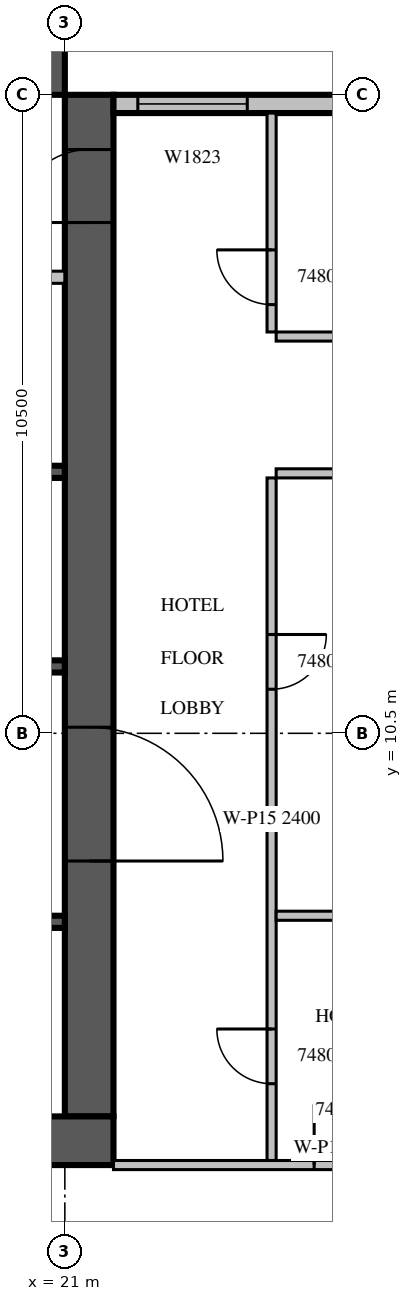
"""IFC4 building model, lengths in metres.
Left out: names, types, materials, properties, quantities, classifications, styles, units other than length and angle.
Written with IfcOpenShell. Run it as: python <this file> out.ifc"""

import sys

from ifc_helpers import new_model, si_unit, direction, frame, frame_2d, origin, place, context, subcontext, project, spatial, rectangle, extrude, source, transform, mapped, element, fill, save


model = new_model("IFC4")
c1 = context("Model", 3, precision=1e-05, world=origin(), true_north=direction((0.0, 1.0)))
c2 = subcontext(c1, "Body", "Model", "MODEL_VIEW")
j1 = project(units=[si_unit("LENGTHUNIT", "METRE"), si_unit("PLANEANGLEUNIT", "RADIAN")], contexts=[c1])
p1 = place(None, origin())
s1 = spatial("IfcSite", under=j1, at=p1, CompositionType="ELEMENT")
p2 = place(p1, origin())
s2 = spatial("IfcBuilding", under=s1, at=p2, CompositionType="ELEMENT")
p3 = place(p2, frame((0.0, 0.0, 215.8)))
s3 = spatial("IfcBuildingStorey", under=s2, at=p3, CompositionType="ELEMENT", Elevation=215.8)
m1 = source(origin(), c2, "Body", "SweptSolid", [
    extrude(rectangle(XDim=16.8, YDim=0.8, at=frame_2d((8.4, 0.0))), origin(), (0.0, 0.0, 1.0), 3.8),
])
p4 = place(p3, frame((21.4, 4.2, 0.0), z_axis=(0.0, 0.0, 1.0), x_axis=(0.0, 1.0, 0.0)))
e1 = element("IfcWall", 1, at=p4, inside=s3, PredefinedType="SHEAR", context=c2, shape_type="MappedRepresentation", body=[
    mapped(m1, transform((0.0, 0.0, 0.0), scale=1.0)),
])
m2 = source(origin(), c2, "Body", "SweptSolid", [
    extrude(rectangle(XDim=2.2, YDim=2.1, at=frame_2d((1.1, 1.05))), frame((0.0, 0.41, 0.0), z_axis=(0.0, -1.0, 0.0), x_axis=(1.0, 0.0, 0.0)), (0.0, 0.0, 1.0), 0.82),
])
p5 = place(p4, frame((4.2, 0.0, 0.0)))
e2 = element("IfcOpeningElement", 2, at=p5, cuts=e1, PredefinedType="OPENING", context=c2, shape_type="MappedRepresentation", body=[
    mapped(m2, transform((0.0, 0.0, 0.0), scale=1.0)),
])
m3 = source(origin(), c2, "Body", "SweptSolid", [
    extrude(rectangle(XDim=1.2, YDim=2.1, at=frame_2d((0.6, 1.05))), frame((0.0, 0.41, 0.0), z_axis=(0.0, -1.0, 0.0), x_axis=(1.0, 0.0, 0.0)), (0.0, 0.0, 1.0), 0.82),
])
p6 = place(p4, frame((14.7, 0.0, 0.0)))
e3 = element("IfcOpeningElement", 3, at=p6, cuts=e1, PredefinedType="OPENING", context=c2, shape_type="MappedRepresentation", body=[
    mapped(m3, transform((0.0, 0.0, 0.0), scale=1.0)),
])
m4 = source(origin(), c2, "Body", "SweptSolid", [
    extrude(rectangle(XDim=17.6, YDim=0.8, at=frame_2d((8.8, 0.0))), origin(), (0.0, 0.0, 1.0), 3.8),
])
p7 = place(p3, frame((4.2, 3.8, 0.0), z_axis=(0.0, 0.0, 1.0), x_axis=(1.0, 0.0, 0.0)))
e4 = element("IfcWall", 4, at=p7, inside=s3, PredefinedType="SHEAR", context=c2, shape_type="MappedRepresentation", body=[
    mapped(m4, transform((0.0, 0.0, 0.0), scale=1.0)),
])
m5 = source(origin(), c2, "Body", "SweptSolid", [
    extrude(rectangle(XDim=0.9, YDim=2.1, at=frame_2d((0.45, 1.05))), frame((0.0, 0.41, 0.0), z_axis=(0.0, -1.0, 0.0), x_axis=(1.0, 0.0, 0.0)), (0.0, 0.0, 1.0), 0.82),
])
p8 = place(p7, frame((12.75, 0.0, 0.0)))
e5 = element("IfcOpeningElement", 5, at=p8, cuts=e4, PredefinedType="OPENING", context=c2, shape_type="MappedRepresentation", body=[
    mapped(m5, transform((0.0, 0.0, 0.0), scale=1.0)),
])
p9 = place(p3, frame((4.2, 21.4, 0.0), z_axis=(0.0, 0.0, 1.0), x_axis=(1.0, 0.0, 0.0)))
e6 = element("IfcWall", 6, at=p9, inside=s3, PredefinedType="SHEAR", context=c2, shape_type="MappedRepresentation", body=[
    mapped(m1, transform((0.0, 0.0, 0.0), scale=1.0)),
])
p10 = place(p9, frame((6.2, 0.0, 0.0)))
e7 = element("IfcOpeningElement", 7, at=p10, cuts=e6, PredefinedType="OPENING", context=c2, shape_type="MappedRepresentation", body=[
    mapped(m3, transform((0.0, 0.0, 0.0), scale=1.0)),
])
m6 = source(origin(), c2, "Body", "SweptSolid", [
    extrude(rectangle(XDim=7.15, YDim=0.3, at=frame_2d((3.575, 0.0))), origin(), (0.0, 0.0, 1.0), 3.4),
])
p11 = place(p3, frame((28.95, 20.85, 0.0), z_axis=(0.0, 0.0, 1.0), x_axis=(-1.0, 0.0, 0.0)))
e8 = element("IfcWall", 8, at=p11, inside=s3, PredefinedType="STANDARD", context=c2, shape_type="MappedRepresentation", body=[
    mapped(m6, transform((0.0, 0.0, 0.0), scale=1.0)),
])
m7 = source(origin(), c2, "Body", "SweptSolid", [
    extrude(rectangle(XDim=3.0, YDim=2.3, at=frame_2d((1.5, 1.15))), frame((0.0, 0.16, 0.0), z_axis=(0.0, -1.0, 0.0), x_axis=(1.0, 0.0, 0.0)), (0.0, 0.0, 1.0), 0.32),
])
p12 = place(p11, frame((0.15, 0.0, 0.6)))
e9 = element("IfcOpeningElement", 9, at=p12, cuts=e8, PredefinedType="OPENING", context=c2, shape_type="MappedRepresentation", body=[
    mapped(m7, transform((0.0, 0.0, 0.0), scale=1.0)),
])
m8 = source(origin(), c2, "Body", "SweptSolid", [
    extrude(rectangle(XDim=1.8, YDim=2.3, at=frame_2d((0.9, 1.15))), frame((0.0, 0.16, 0.0), z_axis=(0.0, -1.0, 0.0), x_axis=(1.0, 0.0, 0.0)), (0.0, 0.0, 1.0), 0.32),
])
p13 = place(p11, frame((4.95, 0.0, 0.6)))
e10 = element("IfcOpeningElement", 10, at=p13, cuts=e8, PredefinedType="OPENING", context=c2, shape_type="MappedRepresentation", body=[
    mapped(m8, transform((0.0, 0.0, 0.0), scale=1.0)),
])
m9 = source(origin(), c2, "Body", "SweptSolid", [
    extrude(rectangle(XDim=2.4, YDim=0.2, at=frame_2d((1.2, 0.0))), origin(), (0.0, 0.0, 1.0), 3.8),
])
p14 = place(p3, frame((18.6, 7.4, 0.0), z_axis=(0.0, 0.0, 1.0), x_axis=(1.0, 0.0, 0.0)))
e11 = element("IfcWall", 11, at=p14, inside=s3, PredefinedType="SOLIDWALL", context=c2, shape_type="MappedRepresentation", body=[
    mapped(m9, transform((0.0, 0.0, 0.0), scale=1.0)),
])
m10 = source(origin(), c2, "Body", "SweptSolid", [
    extrude(rectangle(XDim=9.6, YDim=0.2, at=frame_2d((4.8, 0.0))), origin(), (0.0, 0.0, 1.0), 3.8),
])
p15 = place(p3, frame((11.4, 11.6, 0.0), z_axis=(0.0, 0.0, 1.0), x_axis=(1.0, 0.0, 0.0)))
e12 = element("IfcWall", 12, at=p15, inside=s3, PredefinedType="SOLIDWALL", context=c2, shape_type="MappedRepresentation", body=[
    mapped(m10, transform((0.0, 0.0, 0.0), scale=1.0)),
])
p16 = place(p3, frame((11.4, 14.8, 0.0), z_axis=(0.0, 0.0, 1.0), x_axis=(1.0, 0.0, 0.0)))
e13 = element("IfcWall", 13, at=p16, inside=s3, PredefinedType="SOLIDWALL", context=c2, shape_type="MappedRepresentation", body=[
    mapped(m10, transform((0.0, 0.0, 0.0), scale=1.0)),
])
m11 = source(origin(), c2, "Body", "SweptSolid", [
    extrude(rectangle(XDim=1.1, YDim=2.1, at=frame_2d((0.55, 1.05))), frame((0.0, 0.11, 0.0), z_axis=(0.0, -1.0, 0.0), x_axis=(1.0, 0.0, 0.0)), (0.0, 0.0, 1.0), 0.22),
])
p17 = place(p16, frame((3.05, 0.0, 0.0)))
e14 = element("IfcOpeningElement", 14, at=p17, cuts=e13, PredefinedType="OPENING", context=c2, shape_type="MappedRepresentation", body=[
    mapped(m11, transform((0.0, 0.0, 0.0), scale=1.0)),
])
p18 = place(p16, frame((5.45, 0.0, 0.0)))
e15 = element("IfcOpeningElement", 15, at=p18, cuts=e13, PredefinedType="OPENING", context=c2, shape_type="MappedRepresentation", body=[
    mapped(m11, transform((0.0, 0.0, 0.0), scale=1.0)),
])
p19 = place(p16, frame((7.85, 0.0, 0.0)))
e16 = element("IfcOpeningElement", 16, at=p19, cuts=e13, PredefinedType="OPENING", context=c2, shape_type="MappedRepresentation", body=[
    mapped(m11, transform((0.0, 0.0, 0.0), scale=1.0)),
])
m12 = source(origin(), c2, "Body", "SweptSolid", [
    extrude(rectangle(XDim=11.45, YDim=0.2, at=frame_2d((5.725, 0.0))), origin(), (0.0, 0.0, 1.0), 3.4),
])
p20 = place(p3, frame((9.55, 18.0, 0.0), z_axis=(0.0, 0.0, 1.0), x_axis=(1.0, 0.0, 0.0)))
e17 = element("IfcWall", 17, at=p20, inside=s3, PredefinedType="PARTITIONING", context=c2, shape_type="MappedRepresentation", body=[
    mapped(m12, transform((0.0, 0.0, 0.0), scale=1.0)),
])
m13 = source(origin(), c2, "Body", "SweptSolid", [
    extrude(rectangle(XDim=0.9, YDim=2.1, at=frame_2d((0.45, 1.05))), frame((0.0, 0.11, 0.0), z_axis=(0.0, -1.0, 0.0), x_axis=(1.0, 0.0, 0.0)), (0.0, 0.0, 1.0), 0.22),
])
p21 = place(p20, frame((0.375, 0.0, 0.0)))
e18 = element("IfcOpeningElement", 18, at=p21, cuts=e17, PredefinedType="OPENING", context=c2, shape_type="MappedRepresentation", body=[
    mapped(m13, transform((0.0, 0.0, 0.0), scale=1.0)),
])
p22 = place(p20, frame((1.7, 0.0, 0.0)))
e19 = element("IfcOpeningElement", 19, at=p22, cuts=e17, PredefinedType="OPENING", context=c2, shape_type="MappedRepresentation", body=[
    mapped(m13, transform((0.0, 0.0, 0.0), scale=1.0)),
])
p23 = place(p20, frame((3.075, 0.0, 0.0)))
e20 = element("IfcOpeningElement", 20, at=p23, cuts=e17, PredefinedType="OPENING", context=c2, shape_type="MappedRepresentation", body=[
    mapped(m13, transform((0.0, 0.0, 0.0), scale=1.0)),
])
p24 = place(p20, frame((7.35, 0.0, 0.0)))
e21 = element("IfcOpeningElement", 21, at=p24, cuts=e17, PredefinedType="OPENING", context=c2, shape_type="MappedRepresentation", body=[
    mapped(m11, transform((0.0, 0.0, 0.0), scale=1.0)),
])
m14 = source(origin(), c2, "Body", "SweptSolid", [
    extrude(rectangle(XDim=11.225, YDim=0.15, at=frame_2d((5.612, 0.0))), origin(), (0.0, 0.0, 1.0), 2.4),
])
p25 = place(p3, frame((24.4, 14.7, 0.0), z_axis=(0.0, 0.0, 1.0), x_axis=(0.0, -1.0, 0.0)))
e22 = element("IfcWall", 22, at=p25, inside=s3, PredefinedType="PARTITIONING", context=c2, shape_type="MappedRepresentation", body=[
    mapped(m14, transform((0.0, 0.0, 0.0), scale=1.0)),
])
m15 = source(origin(), c2, "Body", "SweptSolid", [
    extrude(rectangle(XDim=0.9, YDim=2.1, at=frame_2d((0.45, 1.05))), frame((0.0, 0.085, 0.0), z_axis=(0.0, -1.0, 0.0), x_axis=(1.0, 0.0, 0.0)), (0.0, 0.0, 1.0), 0.17),
])
p26 = place(p25, frame((9.062, 0.0, 0.0)))
e23 = element("IfcOpeningElement", 23, at=p26, cuts=e22, PredefinedType="OPENING", context=c2, shape_type="MappedRepresentation", body=[
    mapped(m15, transform((0.0, 0.0, 0.0), scale=1.0)),
])
p27 = place(p25, frame((2.575, 0.0, 0.0)))
e24 = element("IfcOpeningElement", 24, at=p27, cuts=e22, PredefinedType="OPENING", context=c2, shape_type="MappedRepresentation", body=[
    mapped(m15, transform((0.0, 0.0, 0.0), scale=1.0)),
])
m16 = source(origin(), c2, "Body", "SweptSolid", [
    extrude(rectangle(XDim=3.6, YDim=0.15, at=frame_2d((1.8, 0.0))), origin(), (0.0, 0.0, 1.0), 3.4),
])
p28 = place(p3, frame((24.4, 20.7, 0.0), z_axis=(0.0, 0.0, 1.0), x_axis=(0.0, -1.0, 0.0)))
e25 = element("IfcWall", 25, at=p28, inside=s3, PredefinedType="PARTITIONING", context=c2, shape_type="MappedRepresentation", body=[
    mapped(m16, transform((0.0, 0.0, 0.0), scale=1.0)),
])
p29 = place(p28, frame((2.25, 0.0, 0.0)))
e26 = element("IfcOpeningElement", 26, at=p29, cuts=e25, PredefinedType="OPENING", context=c2, shape_type="MappedRepresentation", body=[
    mapped(m15, transform((0.0, 0.0, 0.0), scale=1.0)),
])
m17 = source(origin(), c2, "Body", "SweptSolid", [
    extrude(rectangle(XDim=4.85, YDim=0.15, at=frame_2d((2.425, 0.0))), origin(), (0.0, 0.0, 1.0), 2.9),
])
p30 = place(p3, frame((29.325, 7.5, 0.0), z_axis=(0.0, 0.0, 1.0), x_axis=(-1.0, 0.0, 0.0)))
e27 = element("IfcWall", 27, at=p30, inside=s3, PredefinedType="PARTITIONING", context=c2, shape_type="MappedRepresentation", body=[
    mapped(m17, transform((0.0, 0.0, 0.0), scale=1.0)),
])
m18 = source(origin(), c2, "Body", "SweptSolid", [
    extrude(rectangle(XDim=4.85, YDim=0.15, at=frame_2d((2.425, 0.0))), origin(), (0.0, 0.0, 1.0), 3.4),
])
for number, where, z_axis, x_axis in (
    (28, (29.325, 14.775, 0.0), (0.0, 0.0, 1.0), (-1.0, 0.0, 0.0)),
    (29, (24.475, 17.025, 0.0), (0.0, 0.0, 1.0), (1.0, 0.0, 0.0)),
):
    element("IfcWall", number, at=place(p3, frame(where, z_axis=z_axis, x_axis=x_axis)), inside=s3, PredefinedType="PARTITIONING", context=c2, shape_type="MappedRepresentation", body=[
        mapped(m18, transform((0.0, 0.0, 0.0), scale=1.0)),
    ])
m19 = source(origin(), c2, "Body", "SweptSolid", [
    extrude(rectangle(XDim=7.525, YDim=0.15, at=frame_2d((3.763, 0.0))), origin(), (0.0, 0.0, 1.0), 2.9),
])
p31 = place(p3, frame((21.8, 3.4, 0.0), z_axis=(0.0, 0.0, 1.0), x_axis=(1.0, 0.0, 0.0)))
e30 = element("IfcWall", 30, at=p31, inside=s3, PredefinedType="PARTITIONING", context=c2, shape_type="MappedRepresentation", body=[
    mapped(m19, transform((0.0, 0.0, 0.0), scale=1.0)),
])
m20 = source(origin(), c2, "Body", "SweptSolid", [
    extrude(rectangle(XDim=1.0, YDim=2.1, at=frame_2d((0.5, 1.05))), frame((0.0, 0.085, 0.0), z_axis=(0.0, -1.0, 0.0), x_axis=(1.0, 0.0, 0.0)), (0.0, 0.0, 1.0), 0.17),
])
p32 = place(p31, frame((3.3, 0.0, 0.0)))
e31 = element("IfcOpeningElement", 31, at=p32, cuts=e30, PredefinedType="OPENING", context=c2, shape_type="MappedRepresentation", body=[
    mapped(m20, transform((0.0, 0.0, 0.0), scale=1.0)),
])
p33 = place(p31, frame((4.363, 0.0, 0.0)))
e32 = element("IfcOpeningElement", 32, at=p33, cuts=e30, PredefinedType="OPENING", context=c2, shape_type="MappedRepresentation", body=[
    mapped(m15, transform((0.0, 0.0, 0.0), scale=1.0)),
])
m21 = source(origin(), c2, "Body", "SweptSolid", [
    extrude(rectangle(XDim=1.8, YDim=2.3, at=frame_2d((0.9, 1.15))), frame((0.0, 0.03, 0.0), z_axis=(0.0, -1.0, 0.0), x_axis=(1.0, 0.0, 0.0)), (0.0, 0.0, 1.0), 0.06),
])
p34 = place(p13, origin())
e33 = element("IfcWindow", 33, at=p34, inside=s3, PartitioningType="SINGLE_PANEL", PredefinedType="WINDOW", context=c2, shape_type="MappedRepresentation", body=[
    mapped(m21, transform((0.0, 0.0, 0.0), scale=1.0)),
])
fill(e10, e33)
m22 = source(origin(), c2, "Body", "SweptSolid", [
    extrude(rectangle(XDim=2.2, YDim=2.1, at=frame_2d((1.1, 1.05))), frame((0.0, 0.025, 0.0), z_axis=(0.0, -1.0, 0.0), x_axis=(1.0, 0.0, 0.0)), (0.0, 0.0, 1.0), 0.05),
])
p35 = place(p5, origin())
e34 = element("IfcDoor", 34, at=p35, inside=s3, OperationType="DOUBLE_DOOR_SINGLE_SWING", PredefinedType="DOOR", context=c2, shape_type="MappedRepresentation", body=[
    mapped(m22, transform((0.0, 0.0, 0.0), scale=1.0)),
])
fill(e2, e34)
m23 = source(origin(), c2, "Body", "SweptSolid", [
    extrude(rectangle(XDim=1.2, YDim=2.1, at=frame_2d((0.6, 1.05))), frame((0.0, 0.025, 0.0), z_axis=(0.0, -1.0, 0.0), x_axis=(1.0, 0.0, 0.0)), (0.0, 0.0, 1.0), 0.05),
])
p36 = place(p6, origin())
e35 = element("IfcDoor", 35, at=p36, inside=s3, OperationType="SINGLE_SWING_LEFT", PredefinedType="DOOR", context=c2, shape_type="MappedRepresentation", body=[
    mapped(m23, transform((0.0, 0.0, 0.0), scale=1.0)),
])
fill(e3, e35)
m24 = source(origin(), c2, "Body", "SweptSolid", [
    extrude(rectangle(XDim=0.9, YDim=2.1, at=frame_2d((0.45, 1.05))), frame((0.0, 0.025, 0.0), z_axis=(0.0, -1.0, 0.0), x_axis=(1.0, 0.0, 0.0)), (0.0, 0.0, 1.0), 0.05),
])
p37 = place(p26, origin())
e36 = element("IfcDoor", 36, at=p37, inside=s3, OperationType="SINGLE_SWING_RIGHT", PredefinedType="DOOR", context=c2, shape_type="MappedRepresentation", body=[
    mapped(m24, transform((0.0, 0.0, 0.0), scale=1.0)),
])
fill(e23, e36)
p38 = place(p27, origin())
e37 = element("IfcDoor", 37, at=p38, inside=s3, OperationType="SINGLE_SWING_LEFT", PredefinedType="DOOR", context=c2, shape_type="MappedRepresentation", body=[
    mapped(m24, transform((0.0, 0.0, 0.0), scale=1.0)),
])
fill(e24, e37)
p39 = place(p29, origin())
e38 = element("IfcDoor", 38, at=p39, inside=s3, OperationType="SINGLE_SWING_RIGHT", PredefinedType="DOOR", context=c2, shape_type="MappedRepresentation", body=[
    mapped(m24, transform((0.0, 0.0, 0.0), scale=1.0)),
])
fill(e26, e38)
m25 = source(origin(), c2, "Body", "SweptSolid", [
    extrude(rectangle(XDim=1.0, YDim=2.1, at=frame_2d((0.5, 1.05))), frame((0.0, 0.025, 0.0), z_axis=(0.0, -1.0, 0.0), x_axis=(1.0, 0.0, 0.0)), (0.0, 0.0, 1.0), 0.05),
])
p40 = place(p32, origin())
e39 = element("IfcDoor", 39, at=p40, inside=s3, OperationType="SINGLE_SWING_LEFT", PredefinedType="DOOR", context=c2, shape_type="MappedRepresentation", body=[
    mapped(m25, transform((0.0, 0.0, 0.0), scale=1.0)),
])
fill(e31, e39)
save(model, sys.argv[1])
